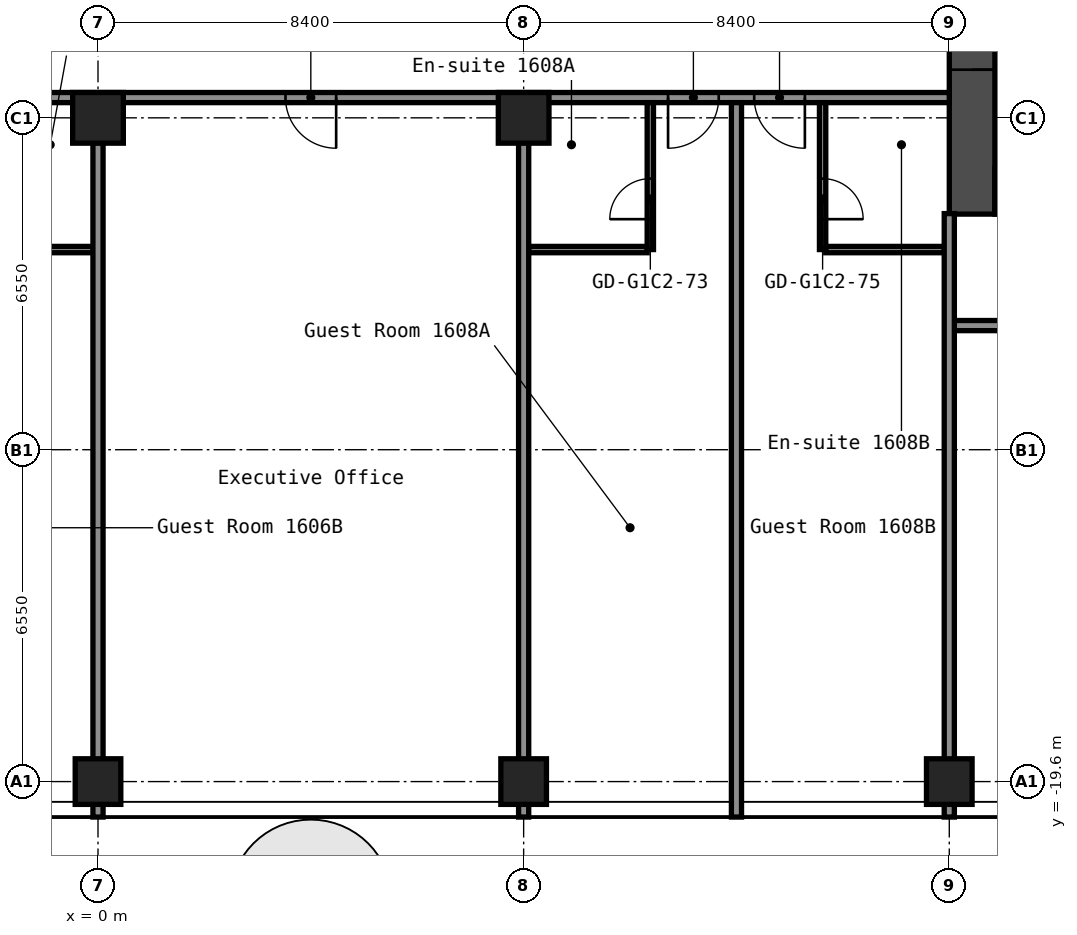
"""IFC4 building model, lengths in metres.
Left out: names, types, materials, properties, quantities, classifications, styles, units other than length and angle.
Written with IfcOpenShell. Run it as: python <this file> out.ifc"""

import sys

from ifc_helpers import new_model, si_unit, direction, frame, frame_2d, origin, origin_2d, place, context, subcontext, project, spatial, rectangle, hollow_rectangle, extrude, element, fill, save


model = new_model("IFC4")
c1 = context("Model", 3, precision=1e-05, world=origin(), true_north=direction((0.0, 1.0)))
c2 = subcontext(c1, "Body", "Model", "MODEL_VIEW")
j1 = project(units=[si_unit("LENGTHUNIT", "METRE"), si_unit("PLANEANGLEUNIT", "RADIAN")], contexts=[c1])
p1 = place(None, origin())
s1 = spatial("IfcSite", under=j1, at=p1, CompositionType="ELEMENT")
p2 = place(p1, origin())
s2 = spatial("IfcBuilding", under=s1, at=p2, CompositionType="ELEMENT")
p3 = place(p2, frame((0.0, 0.0, 58.2)))
s3 = spatial("IfcBuildingStorey", under=s2, at=p3, CompositionType="ELEMENT", Elevation=58.2)
p4 = place(p3, frame((0.0, -19.6, 0.0), z_axis=(0.0, 0.0, 1.0), x_axis=(1.0, 0.0, 0.0)))
e1 = element("IfcColumn", 1, at=p4, inside=s3, PredefinedType="COLUMN", context=c2, shape_type="SweptSolid", body=[
    extrude(hollow_rectangle(XDim=0.9, YDim=0.9, WallThickness=0.036, at=origin_2d()), origin(), (0.0, 0.0, 1.0), 2.8),
])
p5 = place(p3, frame((0.0, -6.5, 0.0), z_axis=(0.0, 0.0, 1.0), x_axis=(1.0, 0.0, 0.0)))
e2 = element("IfcColumn", 2, at=p5, inside=s3, PredefinedType="COLUMN", context=c2, shape_type="SweptSolid", body=[
    extrude(hollow_rectangle(XDim=1.0, YDim=1.0, WallThickness=0.04, at=origin_2d()), origin(), (0.0, 0.0, 1.0), 2.8),
])
p6 = place(p3, frame((8.4, -19.6, 0.0), z_axis=(0.0, 0.0, 1.0), x_axis=(1.0, 0.0, 0.0)))
e3 = element("IfcColumn", 3, at=p6, inside=s3, PredefinedType="COLUMN", context=c2, shape_type="SweptSolid", body=[
    extrude(hollow_rectangle(XDim=0.9, YDim=0.9, WallThickness=0.036, at=origin_2d()), origin(), (0.0, 0.0, 1.0), 2.8),
])
p7 = place(p3, frame((8.4, -6.5, 0.0), z_axis=(0.0, 0.0, 1.0), x_axis=(1.0, 0.0, 0.0)))
e4 = element("IfcColumn", 4, at=p7, inside=s3, PredefinedType="COLUMN", context=c2, shape_type="SweptSolid", body=[
    extrude(hollow_rectangle(XDim=1.0, YDim=1.0, WallThickness=0.04, at=origin_2d()), origin(), (0.0, 0.0, 1.0), 2.8),
])
p8 = place(p3, frame((16.8, -19.6, 0.0), z_axis=(0.0, 0.0, 1.0), x_axis=(1.0, 0.0, 0.0)))
e5 = element("IfcColumn", 5, at=p8, inside=s3, PredefinedType="COLUMN", context=c2, shape_type="SweptSolid", body=[
    extrude(hollow_rectangle(XDim=0.9, YDim=0.9, WallThickness=0.036, at=origin_2d()), origin(), (0.0, 0.0, 1.0), 2.8),
])
p9 = place(p3, frame((17.25, -8.4, 0.0), z_axis=(0.0, 0.0, 1.0), x_axis=(0.0, 1.0, 0.0)))
e6 = element("IfcWall", 6, at=p9, inside=s3, PredefinedType="SHEAR", context=c2, shape_type="SweptSolid", body=[
    extrude(rectangle(XDim=16.8, YDim=0.9, at=frame_2d((8.4, 0.0))), origin(), (0.0, 0.0, 1.0), 2.8),
])
p10 = place(p9, frame((12.75, 0.0, 0.0)))
e7 = element("IfcOpeningElement", 7, at=p10, cuts=e6, PredefinedType="OPENING", context=c2, shape_type="SweptSolid", body=[
    extrude(rectangle(XDim=1.2, YDim=2.1, at=frame_2d((0.6, 1.05))), frame((0.0, 0.46, 0.0), z_axis=(0.0, -1.0, 0.0), x_axis=(1.0, 0.0, 0.0)), (0.0, 0.0, 1.0), 0.92),
])
p11 = place(p9, frame((2.85, 0.0, 0.0)))
e8 = element("IfcOpeningElement", 8, at=p11, cuts=e6, PredefinedType="OPENING", context=c2, shape_type="SweptSolid", body=[
    extrude(rectangle(XDim=1.2, YDim=2.1, at=frame_2d((0.6, 1.05))), frame((0.0, 0.46, 0.0), z_axis=(0.0, -1.0, 0.0), x_axis=(1.0, 0.0, 0.0)), (0.0, 0.0, 1.0), 0.92),
])
p12 = place(p3, frame((17.7, -7.95, 0.0), z_axis=(0.0, 0.0, 1.0), x_axis=(1.0, 0.0, 0.0)))
e9 = element("IfcWall", 9, at=p12, inside=s3, PredefinedType="SHEAR", context=c2, shape_type="SweptSolid", body=[
    extrude(rectangle(XDim=15.0, YDim=0.9, at=frame_2d((7.5, 0.0))), origin(), (0.0, 0.0, 1.0), 2.8),
])
p13 = place(p12, frame((2.55, 0.0, 0.0)))
e10 = element("IfcOpeningElement", 10, at=p13, cuts=e9, PredefinedType="OPENING", context=c2, shape_type="SweptSolid", body=[
    extrude(rectangle(XDim=1.0, YDim=2.1, at=frame_2d((0.5, 1.05))), frame((0.0, 0.46, 0.0), z_axis=(0.0, -1.0, 0.0), x_axis=(1.0, 0.0, 0.0)), (0.0, 0.0, 1.0), 0.92),
])
p14 = place(p3, frame((16.8, -10.6, 0.0), z_axis=(0.0, 0.0, 1.0), x_axis=(1.0, 0.0, 0.0)))
e11 = element("IfcWall", 11, at=p14, inside=s3, PredefinedType="PARTITIONING", context=c2, shape_type="SweptSolid", body=[
    extrude(rectangle(XDim=34.3, YDim=0.2, at=frame_2d((17.15, 0.0))), origin(), (0.0, 0.0, 1.0), 2.8),
])
p15 = place(p14, frame((2.0, 0.0, 0.0)))
e12 = element("IfcOpeningElement", 12, at=p15, cuts=e11, PredefinedType="OPENING", context=c2, shape_type="SweptSolid", body=[
    extrude(rectangle(XDim=1.0, YDim=2.1, at=frame_2d((0.5, 1.05))), frame((0.0, 0.11, 0.0), z_axis=(0.0, -1.0, 0.0), x_axis=(1.0, 0.0, 0.0)), (0.0, 0.0, 1.0), 0.22),
])
p16 = place(p14, frame((11.25, 0.0, 0.0)))
e13 = element("IfcOpeningElement", 13, at=p16, cuts=e11, PredefinedType="OPENING", context=c2, shape_type="SweptSolid", body=[
    extrude(rectangle(XDim=1.0, YDim=2.1, at=frame_2d((0.5, 1.05))), frame((0.0, 0.11, 0.0), z_axis=(0.0, -1.0, 0.0), x_axis=(1.0, 0.0, 0.0)), (0.0, 0.0, 1.0), 0.22),
])
p17 = place(p14, frame((12.95, 0.0, 0.0)))
e14 = element("IfcOpeningElement", 14, at=p17, cuts=e11, PredefinedType="OPENING", context=c2, shape_type="SweptSolid", body=[
    extrude(rectangle(XDim=1.0, YDim=2.1, at=frame_2d((0.5, 1.05))), frame((0.0, 0.11, 0.0), z_axis=(0.0, -1.0, 0.0), x_axis=(1.0, 0.0, 0.0)), (0.0, 0.0, 1.0), 0.22),
])
p18 = place(p14, frame((22.3, 0.0, 0.0)))
e15 = element("IfcOpeningElement", 15, at=p18, cuts=e11, PredefinedType="OPENING", context=c2, shape_type="SweptSolid", body=[
    extrude(rectangle(XDim=1.0, YDim=2.1, at=frame_2d((0.5, 1.05))), frame((0.0, 0.11, 0.0), z_axis=(0.0, -1.0, 0.0), x_axis=(1.0, 0.0, 0.0)), (0.0, 0.0, 1.0), 0.22),
])
p19 = place(p14, frame((28.15, 0.0, 0.0)))
e16 = element("IfcOpeningElement", 16, at=p19, cuts=e11, PredefinedType="OPENING", context=c2, shape_type="SweptSolid", body=[
    extrude(rectangle(XDim=1.0, YDim=2.1, at=frame_2d((0.5, 1.05))), frame((0.0, 0.11, 0.0), z_axis=(0.0, -1.0, 0.0), x_axis=(1.0, 0.0, 0.0)), (0.0, 0.0, 1.0), 0.22),
])
p20 = place(p14, frame((30.05, 0.0, 0.0)))
e17 = element("IfcOpeningElement", 17, at=p20, cuts=e11, PredefinedType="OPENING", context=c2, shape_type="SweptSolid", body=[
    extrude(rectangle(XDim=1.0, YDim=2.1, at=frame_2d((0.5, 1.05))), frame((0.0, 0.11, 0.0), z_axis=(0.0, -1.0, 0.0), x_axis=(1.0, 0.0, 0.0)), (0.0, 0.0, 1.0), 0.22),
])
for number, where, z_axis, x_axis in (
    (18, (-2.438, -9.1, 0.0), (0.0, 0.0, 1.0), (1.0, 0.0, 0.0)),
    (19, (8.5, -9.1, 0.0), (0.0, 0.0, 1.0), (1.0, 0.0, 0.0)),
    (20, (14.363, -9.1, 0.0), (0.0, 0.0, 1.0), (1.0, 0.0, 0.0)),
):
    element("IfcWall", number, at=place(p3, frame(where, z_axis=z_axis, x_axis=x_axis)), inside=s3, PredefinedType="PARTITIONING", context=c2, shape_type="SweptSolid", body=[
        extrude(rectangle(XDim=2.337, YDim=0.125, at=frame_2d((1.169, 0.0))), origin(), (0.0, 0.0, 1.0), 2.8),
    ])
p21 = place(p3, frame((-16.8, -6.1, 0.0), z_axis=(0.0, 0.0, 1.0), x_axis=(1.0, 0.0, 0.0)))
e21 = element("IfcWall", 21, at=p21, inside=s3, PredefinedType="PARTITIONING", context=c2, shape_type="SweptSolid", body=[
    extrude(rectangle(XDim=33.6, YDim=0.2, at=frame_2d((16.8, 0.0))), origin(), (0.0, 0.0, 1.0), 2.8),
])
p22 = place(p21, frame((2.0, 0.0, 0.0)))
e22 = element("IfcOpeningElement", 22, at=p22, cuts=e21, PredefinedType="OPENING", context=c2, shape_type="SweptSolid", body=[
    extrude(rectangle(XDim=1.0, YDim=2.1, at=frame_2d((0.5, 1.05))), frame((0.0, 0.11, 0.0), z_axis=(0.0, -1.0, 0.0), x_axis=(1.0, 0.0, 0.0)), (0.0, 0.0, 1.0), 0.22),
])
p23 = place(p21, frame((11.25, 0.0, 0.0)))
e23 = element("IfcOpeningElement", 23, at=p23, cuts=e21, PredefinedType="OPENING", context=c2, shape_type="SweptSolid", body=[
    extrude(rectangle(XDim=1.0, YDim=2.1, at=frame_2d((0.5, 1.05))), frame((0.0, 0.11, 0.0), z_axis=(0.0, -1.0, 0.0), x_axis=(1.0, 0.0, 0.0)), (0.0, 0.0, 1.0), 0.22),
])
p24 = place(p21, frame((12.95, 0.0, 0.0)))
e24 = element("IfcOpeningElement", 24, at=p24, cuts=e21, PredefinedType="OPENING", context=c2, shape_type="SweptSolid", body=[
    extrude(rectangle(XDim=1.0, YDim=2.1, at=frame_2d((0.5, 1.05))), frame((0.0, 0.11, 0.0), z_axis=(0.0, -1.0, 0.0), x_axis=(1.0, 0.0, 0.0)), (0.0, 0.0, 1.0), 0.22),
])
p25 = place(p21, frame((20.5, 0.0, 0.0)))
e25 = element("IfcOpeningElement", 25, at=p25, cuts=e21, PredefinedType="OPENING", context=c2, shape_type="SweptSolid", body=[
    extrude(rectangle(XDim=1.0, YDim=2.1, at=frame_2d((0.5, 1.05))), frame((0.0, 0.11, 0.0), z_axis=(0.0, -1.0, 0.0), x_axis=(1.0, 0.0, 0.0)), (0.0, 0.0, 1.0), 0.22),
])
p26 = place(p21, frame((28.05, 0.0, 0.0)))
e26 = element("IfcOpeningElement", 26, at=p26, cuts=e21, PredefinedType="OPENING", context=c2, shape_type="SweptSolid", body=[
    extrude(rectangle(XDim=1.0, YDim=2.1, at=frame_2d((0.5, 1.05))), frame((0.0, 0.11, 0.0), z_axis=(0.0, -1.0, 0.0), x_axis=(1.0, 0.0, 0.0)), (0.0, 0.0, 1.0), 0.22),
])
p27 = place(p21, frame((29.75, 0.0, 0.0)))
e27 = element("IfcOpeningElement", 27, at=p27, cuts=e21, PredefinedType="OPENING", context=c2, shape_type="SweptSolid", body=[
    extrude(rectangle(XDim=1.0, YDim=2.1, at=frame_2d((0.5, 1.05))), frame((0.0, 0.11, 0.0), z_axis=(0.0, -1.0, 0.0), x_axis=(1.0, 0.0, 0.0)), (0.0, 0.0, 1.0), 0.22),
])
for number, where, z_axis, x_axis in (
    (28, (0.0, -20.3, 0.0), (0.0, 0.0, 1.0), (0.0, 1.0, 0.0)),
    (29, (8.4, -20.3, 0.0), (0.0, 0.0, 1.0), (0.0, 1.0, 0.0)),
):
    element("IfcWall", number, at=place(p3, frame(where, z_axis=z_axis, x_axis=x_axis)), inside=s3, PredefinedType="PARTITIONING", context=c2, shape_type="SweptSolid", body=[
        extrude(rectangle(XDim=13.31, YDim=0.2, at=frame_2d((6.655, 0.0))), origin(), (0.0, 0.0, 1.0), 2.8),
    ])
p28 = place(p3, frame((10.9, -9.1, 0.0), z_axis=(0.0, 0.0, 1.0), x_axis=(0.0, 1.0, 0.0)))
e30 = element("IfcWall", 30, at=p28, inside=s3, PredefinedType="PARTITIONING", context=c2, shape_type="SweptSolid", body=[
    extrude(rectangle(XDim=2.9, YDim=0.125, at=frame_2d((1.45, 0.0))), origin(), (0.0, 0.0, 1.0), 2.8),
])
p29 = place(p28, frame((0.6, 0.0, 0.0)))
e31 = element("IfcOpeningElement", 31, at=p29, cuts=e30, PredefinedType="OPENING", context=c2, shape_type="SweptSolid", body=[
    extrude(rectangle(XDim=0.8, YDim=2.1, at=frame_2d((0.4, 1.05))), frame((0.0, 0.073, 0.0), z_axis=(0.0, -1.0, 0.0), x_axis=(1.0, 0.0, 0.0)), (0.0, 0.0, 1.0), 0.145),
])
p30 = place(p3, frame((12.6, -20.3, 0.0), z_axis=(0.0, 0.0, 1.0), x_axis=(0.0, 1.0, 0.0)))
e32 = element("IfcWall", 32, at=p30, inside=s3, PredefinedType="PARTITIONING", context=c2, shape_type="SweptSolid", body=[
    extrude(rectangle(XDim=14.1, YDim=0.2, at=frame_2d((7.05, 0.0))), origin(), (0.0, 0.0, 1.0), 2.8),
])
p31 = place(p3, frame((14.3, -9.1, 0.0), z_axis=(0.0, 0.0, 1.0), x_axis=(0.0, 1.0, 0.0)))
e33 = element("IfcWall", 33, at=p31, inside=s3, PredefinedType="PARTITIONING", context=c2, shape_type="SweptSolid", body=[
    extrude(rectangle(XDim=2.9, YDim=0.125, at=frame_2d((1.45, 0.0))), origin(), (0.0, 0.0, 1.0), 2.8),
])
p32 = place(p31, frame((0.6, 0.0, 0.0)))
e34 = element("IfcOpeningElement", 34, at=p32, cuts=e33, PredefinedType="OPENING", context=c2, shape_type="SweptSolid", body=[
    extrude(rectangle(XDim=0.8, YDim=2.1, at=frame_2d((0.4, 1.05))), frame((0.0, 0.073, 0.0), z_axis=(0.0, -1.0, 0.0), x_axis=(1.0, 0.0, 0.0)), (0.0, 0.0, 1.0), 0.145),
])
p33 = place(p3, frame((16.8, -20.3, 0.0), z_axis=(0.0, 0.0, 1.0), x_axis=(0.0, 1.0, 0.0)))
e35 = element("IfcWall", 35, at=p33, inside=s3, PredefinedType="PARTITIONING", context=c2, shape_type="SweptSolid", body=[
    extrude(rectangle(XDim=11.91, YDim=0.2, at=frame_2d((5.955, 0.0))), origin(), (0.0, 0.0, 1.0), 2.8),
])
p34 = place(p11, origin())
e36 = element("IfcDoor", 36, at=p34, inside=s3, OperationType="DOUBLE_DOOR_SINGLE_SWING", PredefinedType="DOOR", context=c2, shape_type="SweptSolid", body=[
    extrude(rectangle(XDim=1.2, YDim=2.1, at=frame_2d((0.6, 1.05))), frame((0.0, 0.025, 0.0), z_axis=(0.0, -1.0, 0.0), x_axis=(1.0, 0.0, 0.0)), (0.0, 0.0, 1.0), 0.05),
])
fill(e8, e36)
p35 = place(p25, origin())
e37 = element("IfcDoor", 37, at=p35, inside=s3, OperationType="SINGLE_SWING_RIGHT", PredefinedType="DOOR", context=c2, shape_type="SweptSolid", body=[
    extrude(rectangle(XDim=1.0, YDim=2.1, at=frame_2d((0.5, 1.05))), frame((0.0, 0.025, 0.0), z_axis=(0.0, -1.0, 0.0), x_axis=(1.0, 0.0, 0.0)), (0.0, 0.0, 1.0), 0.05),
])
fill(e25, e37)
p36 = place(p26, origin())
e38 = element("IfcDoor", 38, at=p36, inside=s3, OperationType="SINGLE_SWING_LEFT", PredefinedType="DOOR", context=c2, shape_type="SweptSolid", body=[
    extrude(rectangle(XDim=1.0, YDim=2.1, at=frame_2d((0.5, 1.05))), frame((0.0, 0.025, 0.0), z_axis=(0.0, -1.0, 0.0), x_axis=(1.0, 0.0, 0.0)), (0.0, 0.0, 1.0), 0.05),
])
fill(e26, e38)
p37 = place(p27, origin())
e39 = element("IfcDoor", 39, at=p37, inside=s3, OperationType="SINGLE_SWING_RIGHT", PredefinedType="DOOR", context=c2, shape_type="SweptSolid", body=[
    extrude(rectangle(XDim=1.0, YDim=2.1, at=frame_2d((0.5, 1.05))), frame((0.0, 0.025, 0.0), z_axis=(0.0, -1.0, 0.0), x_axis=(1.0, 0.0, 0.0)), (0.0, 0.0, 1.0), 0.05),
])
fill(e27, e39)
p38 = place(p29, origin())
e40 = element("IfcDoor", 40, at=p38, inside=s3, OperationType="SINGLE_SWING_RIGHT", PredefinedType="DOOR", context=c2, shape_type="SweptSolid", body=[
    extrude(rectangle(XDim=0.8, YDim=2.1, at=frame_2d((0.4, 1.05))), frame((0.0, 0.025, 0.0), z_axis=(0.0, -1.0, 0.0), x_axis=(1.0, 0.0, 0.0)), (0.0, 0.0, 1.0), 0.05),
])
fill(e31, e40)
p39 = place(p32, origin())
e41 = element("IfcDoor", 41, at=p39, inside=s3, OperationType="SINGLE_SWING_LEFT", PredefinedType="DOOR", context=c2, shape_type="SweptSolid", body=[
    extrude(rectangle(XDim=0.8, YDim=2.1, at=frame_2d((0.4, 1.05))), frame((0.0, 0.025, 0.0), z_axis=(0.0, -1.0, 0.0), x_axis=(1.0, 0.0, 0.0)), (0.0, 0.0, 1.0), 0.05),
])
fill(e34, e41)
save(model, sys.argv[1])
